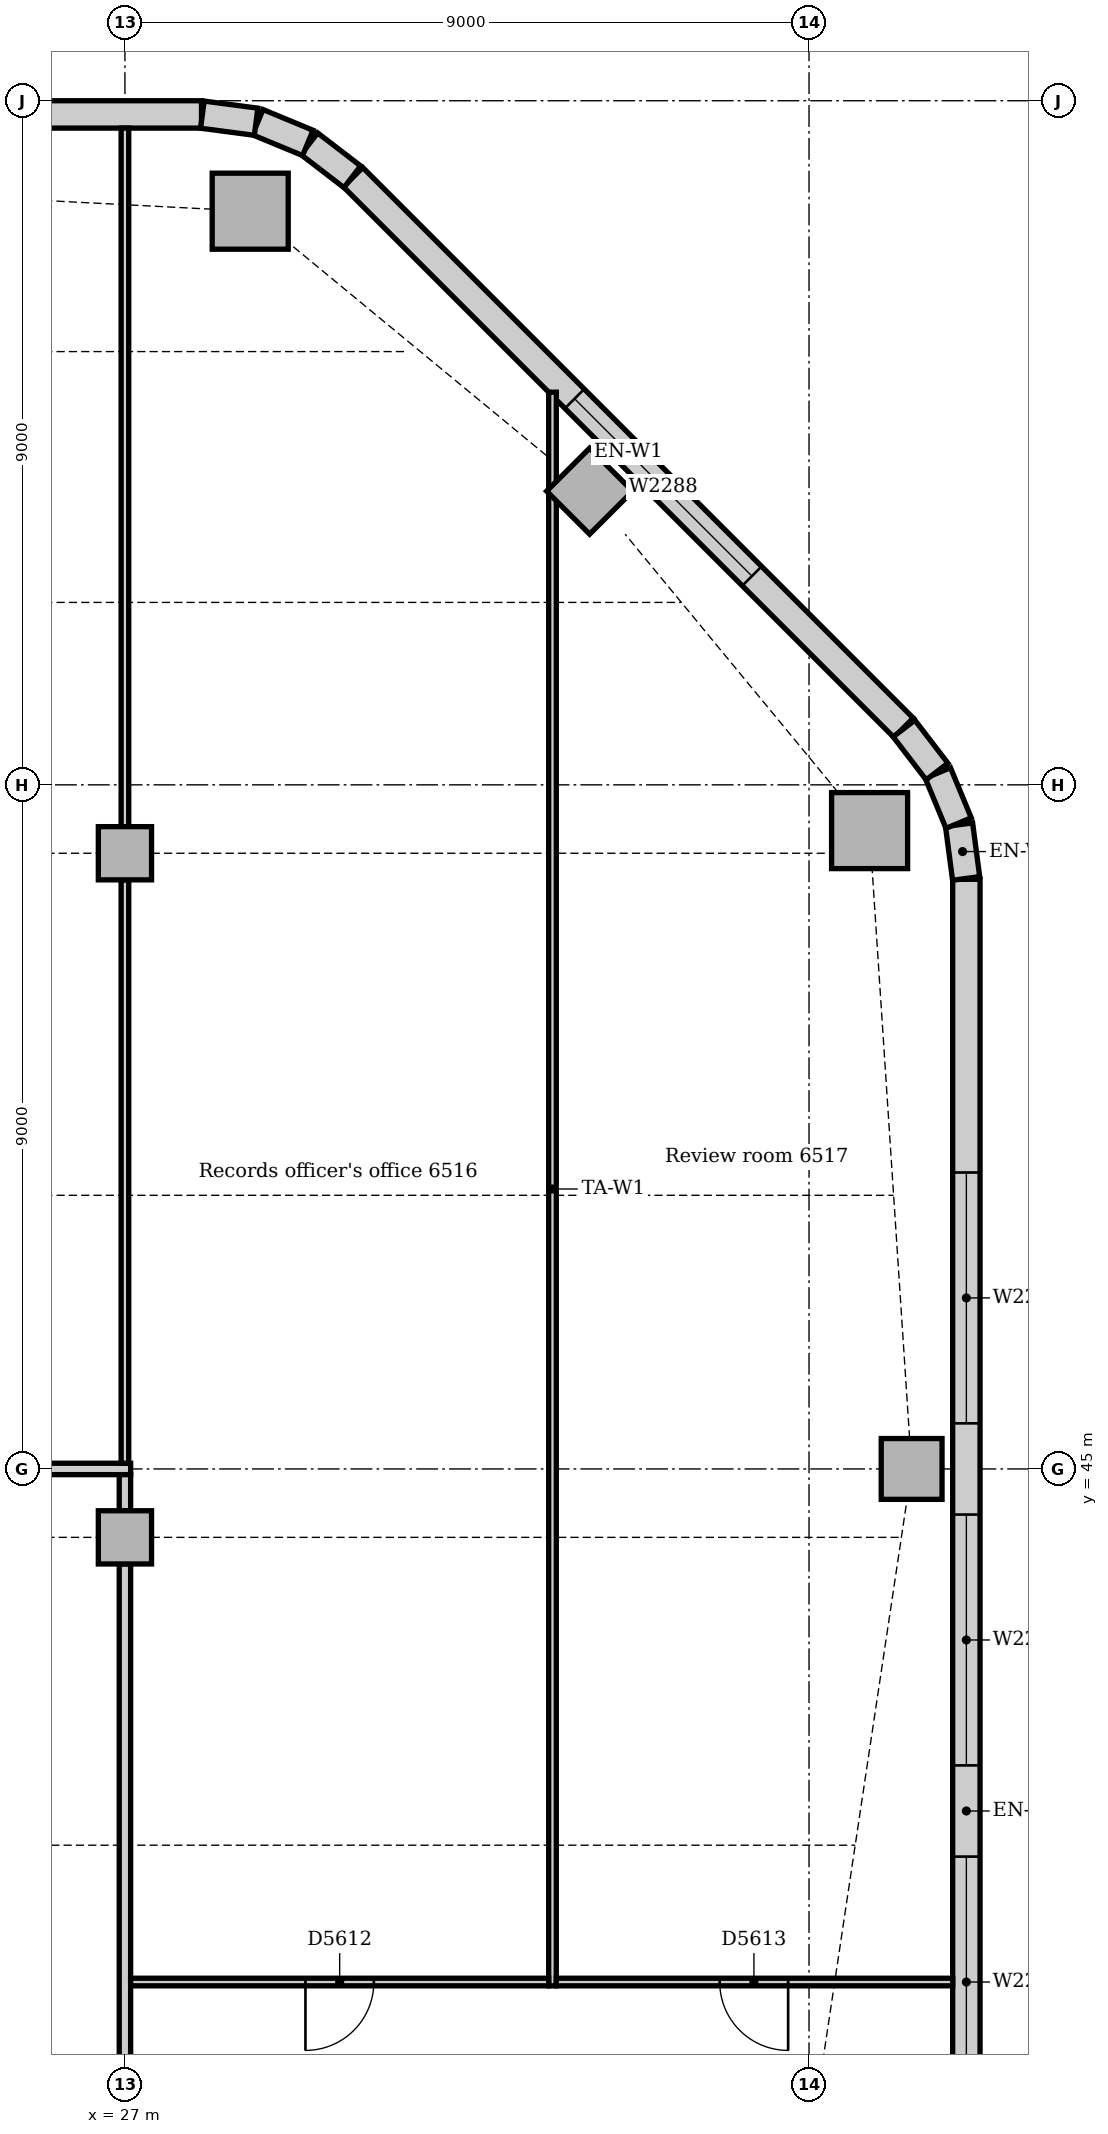
"""IFC4 building model, lengths in metres.
Left out: names, types, materials, properties, quantities, classifications, styles, units other than length and angle.
Written with IfcOpenShell. Run it as: python <this file> out.ifc"""

import sys

from ifc_helpers import new_model, si_unit, direction, frame, frame_2d, origin, origin_2d, place, context, subcontext, project, spatial, rectangle, extrude, element, fill, save


model = new_model("IFC4")
c1 = context("Model", 3, precision=1e-05, world=origin(), true_north=direction((0.0, 1.0)))
c2 = subcontext(c1, "Body", "Model", "MODEL_VIEW")
j1 = project(units=[si_unit("LENGTHUNIT", "METRE"), si_unit("PLANEANGLEUNIT", "RADIAN")], contexts=[c1])
p1 = place(None, origin())
s1 = spatial("IfcSite", under=j1, at=p1, CompositionType="ELEMENT")
p2 = place(p1, origin())
s2 = spatial("IfcBuilding", under=s1, at=p2, CompositionType="ELEMENT")
p3 = place(p2, frame((0.0, 0.0, 271.0)))
s3 = spatial("IfcBuildingStorey", under=s2, at=p3, CompositionType="ELEMENT", Elevation=271.0)
for number, where, z_axis, x_axis in (
    (1, (36.797, 53.398, 0.0), (0.0, 0.0, 1.0), (1.0, 0.0, 0.0)),
    (2, (28.648, 61.547, 0.0), (0.0, 0.0, 1.0), (1.0, 0.0, 0.0)),
):
    element("IfcColumn", number, at=place(p3, frame(where, z_axis=z_axis, x_axis=x_axis)), inside=s3, PredefinedType="COLUMN", context=c2, shape_type="SweptSolid", body=[
        extrude(rectangle(XDim=1.0, YDim=1.0, at=origin_2d()), origin(), (0.0, 0.0, 1.0), 3.85),
    ])
for number, where, z_axis, x_axis in (
    (3, (37.35, 45.0, 0.0), (0.0, 0.0, 1.0), (1.0, 0.0, 0.0)),
    (4, (33.114, 57.864, 0.0), (0.0, 0.0, 1.0), (0.707, 0.707, 0.0)),
):
    element("IfcColumn", number, at=place(p3, frame(where, z_axis=z_axis, x_axis=x_axis)), inside=s3, PredefinedType="COLUMN", context=c2, shape_type="SweptSolid", body=[
        extrude(rectangle(XDim=0.8, YDim=0.8, at=origin_2d()), origin(), (0.0, 0.0, 1.0), 3.85),
    ])
for number, where, z_axis, x_axis in (
    (5, (27.0, 44.1, 0.0), (0.0, 0.0, 1.0), (1.0, 0.0, 0.0)),
    (6, (27.0, 53.1, 0.0), (0.0, 0.0, 1.0), (1.0, 0.0, 0.0)),
):
    element("IfcColumn", number, at=place(p3, frame(where, z_axis=z_axis, x_axis=x_axis)), inside=s3, PredefinedType="COLUMN", context=c2, shape_type="SweptSolid", body=[
        extrude(rectangle(XDim=0.7, YDim=0.7, at=origin_2d()), origin(), (0.0, 0.0, 1.0), 3.85),
    ])
p4 = place(p3, frame((38.07, 28.243, 0.0), z_axis=(0.0, 0.0, 1.0), x_axis=(0.0, 1.0, 0.0)))
e7 = element("IfcWall", 7, at=p4, inside=s3, PredefinedType="STANDARD", context=c2, shape_type="SweptSolid", body=[
    extrude(rectangle(XDim=24.515, YDim=0.36, at=frame_2d((12.257, 0.0))), origin(), (0.0, 0.0, 1.0), 3.85),
])
p5 = place(p4, frame((3.857, 0.0, 0.9)))
e8 = element("IfcOpeningElement", 8, at=p5, cuts=e7, PredefinedType="OPENING", context=c2, shape_type="SweptSolid", body=[
    extrude(rectangle(XDim=3.3, YDim=1.6, at=frame_2d((1.65, 0.8))), frame((0.0, 0.19, 0.0), z_axis=(0.0, -1.0, 0.0), x_axis=(1.0, 0.0, 0.0)), (0.0, 0.0, 1.0), 0.38),
])
p6 = place(p4, frame((8.357, 0.0, 0.9)))
e9 = element("IfcOpeningElement", 9, at=p6, cuts=e7, PredefinedType="OPENING", context=c2, shape_type="SweptSolid", body=[
    extrude(rectangle(XDim=3.3, YDim=1.6, at=frame_2d((1.65, 0.8))), frame((0.0, 0.19, 0.0), z_axis=(0.0, -1.0, 0.0), x_axis=(1.0, 0.0, 0.0)), (0.0, 0.0, 1.0), 0.38),
])
p7 = place(p4, frame((12.857, 0.0, 0.9)))
e10 = element("IfcOpeningElement", 10, at=p7, cuts=e7, PredefinedType="OPENING", context=c2, shape_type="SweptSolid", body=[
    extrude(rectangle(XDim=3.3, YDim=1.6, at=frame_2d((1.65, 0.8))), frame((0.0, 0.19, 0.0), z_axis=(0.0, -1.0, 0.0), x_axis=(1.0, 0.0, 0.0)), (0.0, 0.0, 1.0), 0.38),
])
p8 = place(p4, frame((17.357, 0.0, 0.9)))
e11 = element("IfcOpeningElement", 11, at=p8, cuts=e7, PredefinedType="OPENING", context=c2, shape_type="SweptSolid", body=[
    extrude(rectangle(XDim=3.3, YDim=1.6, at=frame_2d((1.65, 0.8))), frame((0.0, 0.19, 0.0), z_axis=(0.0, -1.0, 0.0), x_axis=(1.0, 0.0, 0.0)), (0.0, 0.0, 1.0), 0.38),
])
p9 = place(p3, frame((37.244, 54.751, 0.0), z_axis=(0.0, 0.0, 1.0), x_axis=(-0.707106781187, 0.707106781187, 0.0)))
e12 = element("IfcWall", 12, at=p9, inside=s3, PredefinedType="STANDARD", context=c2, shape_type="SweptSolid", body=[
    extrude(rectangle(XDim=10.243, YDim=0.36, at=frame_2d((5.121, 0.0))), origin(), (0.0, 0.0, 1.0), 3.85),
])
p10 = place(p9, frame((2.821, 0.0, 0.9)))
e13 = element("IfcOpeningElement", 13, at=p10, cuts=e12, PredefinedType="OPENING", context=c2, shape_type="SweptSolid", body=[
    extrude(rectangle(XDim=3.3, YDim=1.6, at=frame_2d((1.65, 0.8))), frame((0.0, 0.19, 0.0), z_axis=(0.0, -1.0, 0.0), x_axis=(1.0, 0.0, 0.0)), (0.0, 0.0, 1.0), 0.38),
])
p11 = place(p3, frame((28.007, 62.82, 0.0), z_axis=(0.0, 0.0, 1.0), x_axis=(-1.0, 0.0, 0.0)))
e14 = element("IfcWall", 14, at=p11, inside=s3, PredefinedType="STANDARD", context=c2, shape_type="SweptSolid", body=[
    extrude(rectangle(XDim=23.765, YDim=0.36, at=frame_2d((11.882, 0.0))), origin(), (0.0, 0.0, 1.0), 3.85),
])
p12 = place(p11, frame((3.482, 0.0, 0.9)))
e15 = element("IfcOpeningElement", 15, at=p12, cuts=e14, PredefinedType="OPENING", context=c2, shape_type="SweptSolid", body=[
    extrude(rectangle(XDim=3.3, YDim=1.6, at=frame_2d((1.65, 0.8))), frame((0.0, 0.19, 0.0), z_axis=(0.0, -1.0, 0.0), x_axis=(1.0, 0.0, 0.0)), (0.0, 0.0, 1.0), 0.38),
])
p13 = place(p11, frame((7.982, 0.0, 0.9)))
e16 = element("IfcOpeningElement", 16, at=p13, cuts=e14, PredefinedType="OPENING", context=c2, shape_type="SweptSolid", body=[
    extrude(rectangle(XDim=3.3, YDim=1.6, at=frame_2d((1.65, 0.8))), frame((0.0, 0.19, 0.0), z_axis=(0.0, -1.0, 0.0), x_axis=(1.0, 0.0, 0.0)), (0.0, 0.0, 1.0), 0.38),
])
p14 = place(p11, frame((12.482, 0.0, 0.9)))
e17 = element("IfcOpeningElement", 17, at=p14, cuts=e14, PredefinedType="OPENING", context=c2, shape_type="SweptSolid", body=[
    extrude(rectangle(XDim=3.3, YDim=1.6, at=frame_2d((1.65, 0.8))), frame((0.0, 0.19, 0.0), z_axis=(0.0, -1.0, 0.0), x_axis=(1.0, 0.0, 0.0)), (0.0, 0.0, 1.0), 0.38),
])
p15 = place(p11, frame((16.982, 0.0, 0.9)))
e18 = element("IfcOpeningElement", 18, at=p15, cuts=e14, PredefinedType="OPENING", context=c2, shape_type="SweptSolid", body=[
    extrude(rectangle(XDim=3.3, YDim=1.6, at=frame_2d((1.65, 0.8))), frame((0.0, 0.19, 0.0), z_axis=(0.0, -1.0, 0.0), x_axis=(1.0, 0.0, 0.0)), (0.0, 0.0, 1.0), 0.38),
])
for number, where, z_axis, x_axis in (
    (19, (38.067, 52.769, 0.0), (0.0, 0.0, 1.0), (-0.131, 0.991, 0.0)),
    (20, (37.968, 53.497, 0.0), (0.0, 0.0, 1.0), (-0.383, 0.924, 0.0)),
):
    element("IfcWall", number, at=place(p3, frame(where, z_axis=z_axis, x_axis=x_axis)), inside=s3, PredefinedType="STANDARD", context=c2, shape_type="SweptSolid", body=[
        extrude(rectangle(XDim=0.713, YDim=0.36, at=frame_2d((0.356, 0.0))), origin(), (0.0, 0.0, 1.0), 3.85),
    ])
for number, where, z_axis, x_axis in (
    (21, (37.684, 54.175, 0.0), (0.0, 0.0, 1.0), (-0.609, 0.793, 0.0)),
    (22, (29.991, 62.0, 0.0), (0.0, 0.0, 1.0), (-0.793, 0.609, 0.0)),
):
    element("IfcWall", number, at=place(p3, frame(where, z_axis=z_axis, x_axis=x_axis)), inside=s3, PredefinedType="STANDARD", context=c2, shape_type="SweptSolid", body=[
        extrude(rectangle(XDim=0.713, YDim=0.36, at=frame_2d((0.357, 0.0))), origin(), (0.0, 0.0, 1.0), 3.85),
    ])
for number, where, z_axis, x_axis in (
    (23, (29.406, 62.445, 0.0), (0.0, 0.0, 1.0), (-0.924, 0.383, 0.0)),
    (24, (28.726, 62.724, 0.0), (0.0, 0.0, 1.0), (-0.991, 0.131, 0.0)),
):
    element("IfcWall", number, at=place(p3, frame(where, z_axis=z_axis, x_axis=x_axis)), inside=s3, PredefinedType="STANDARD", context=c2, shape_type="SweptSolid", body=[
        extrude(rectangle(XDim=0.713, YDim=0.36, at=frame_2d((0.356, 0.0))), origin(), (0.0, 0.0, 1.0), 3.85),
    ])
p16 = place(p3, frame((0.36, 45.0, 0.0), z_axis=(0.0, 0.0, 1.0), x_axis=(1.0, 0.0, 0.0)))
e25 = element("IfcWall", 25, at=p16, inside=s3, PredefinedType="PARTITIONING", context=c2, shape_type="SweptSolid", body=[
    extrude(rectangle(XDim=26.715, YDim=0.15, at=frame_2d((13.357, 0.0))), origin(), (0.0, 0.0, 1.0), 3.85),
])
p17 = place(p16, frame((3.9, 0.0, 0.0)))
e26 = element("IfcOpeningElement", 26, at=p17, cuts=e25, PredefinedType="OPENING", context=c2, shape_type="SweptSolid", body=[
    extrude(rectangle(XDim=1.0, YDim=2.1, at=frame_2d((0.5, 1.05))), frame((0.0, 0.085, 0.0), z_axis=(0.0, -1.0, 0.0), x_axis=(1.0, 0.0, 0.0)), (0.0, 0.0, 1.0), 0.17),
])
p18 = place(p16, frame((16.39, 0.0, 0.0)))
e27 = element("IfcOpeningElement", 27, at=p18, cuts=e25, PredefinedType="OPENING", context=c2, shape_type="SweptSolid", body=[
    extrude(rectangle(XDim=0.9, YDim=2.1, at=frame_2d((0.45, 1.05))), frame((0.0, 0.085, 0.0), z_axis=(0.0, -1.0, 0.0), x_axis=(1.0, 0.0, 0.0)), (0.0, 0.0, 1.0), 0.17),
])
p19 = place(p3, frame((27.0, 36.35, 0.0), z_axis=(0.0, 0.0, 1.0), x_axis=(0.0, 1.0, 0.0)))
e28 = element("IfcWall", 28, at=p19, inside=s3, PredefinedType="PARTITIONING", context=c2, shape_type="SweptSolid", body=[
    extrude(rectangle(XDim=7.4, YDim=0.15, at=frame_2d((3.7, 0.0))), origin(), (0.0, 0.0, 1.0), 3.4),
])
p20 = place(p3, frame((27.0, 44.45, 0.0), z_axis=(0.0, 0.0, 1.0), x_axis=(0.0, 1.0, 0.0)))
e29 = element("IfcWall", 29, at=p20, inside=s3, PredefinedType="PARTITIONING", context=c2, shape_type="SweptSolid", body=[
    extrude(rectangle(XDim=0.475, YDim=0.15, at=frame_2d((0.237, 0.0))), origin(), (0.0, 0.0, 1.0), 3.85),
])
p21 = place(p3, frame((32.625, 38.2, 0.0), z_axis=(0.0, 0.0, 1.0), x_axis=(0.0, 1.0, 0.0)))
e30 = element("IfcWall", 30, at=p21, inside=s3, PredefinedType="PARTITIONING", context=c2, shape_type="SweptSolid", body=[
    extrude(rectangle(XDim=20.966, YDim=0.1, at=frame_2d((10.483, 0.0))), origin(), (0.0, 0.0, 1.0), 3.85),
])
p22 = place(p3, frame((27.0, 45.075, 0.0), z_axis=(0.0, 0.0, 1.0), x_axis=(0.0, 1.0, 0.0)))
e31 = element("IfcWall", 31, at=p22, inside=s3, PredefinedType="PARTITIONING", context=c2, shape_type="SweptSolid", body=[
    extrude(rectangle(XDim=7.675, YDim=0.1, at=frame_2d((3.837, 0.0))), origin(), (0.0, 0.0, 1.0), 3.4),
])
p23 = place(p3, frame((27.0, 53.45, 0.0), z_axis=(0.0, 0.0, 1.0), x_axis=(0.0, 1.0, 0.0)))
e32 = element("IfcWall", 32, at=p23, inside=s3, PredefinedType="PARTITIONING", context=c2, shape_type="SweptSolid", body=[
    extrude(rectangle(XDim=9.19, YDim=0.1, at=frame_2d((4.595, 0.0))), origin(), (0.0, 0.0, 1.0), 3.4),
])
p24 = place(p3, frame((27.075, 38.25, 0.0), z_axis=(0.0, 0.0, 1.0), x_axis=(1.0, 0.0, 0.0)))
e33 = element("IfcWall", 33, at=p24, inside=s3, PredefinedType="PARTITIONING", context=c2, shape_type="SweptSolid", body=[
    extrude(rectangle(XDim=5.5, YDim=0.1, at=frame_2d((2.75, 0.0))), origin(), (0.0, 0.0, 1.0), 3.85),
])
p25 = place(p24, frame((2.3, 0.0, 0.0)))
e34 = element("IfcOpeningElement", 34, at=p25, cuts=e33, PredefinedType="OPENING", context=c2, shape_type="SweptSolid", body=[
    extrude(rectangle(XDim=0.9, YDim=2.1, at=frame_2d((0.45, 1.05))), frame((0.0, 0.06, 0.0), z_axis=(0.0, -1.0, 0.0), x_axis=(1.0, 0.0, 0.0)), (0.0, 0.0, 1.0), 0.12),
])
p26 = place(p3, frame((32.675, 38.25, 0.0), z_axis=(0.0, 0.0, 1.0), x_axis=(1.0, 0.0, 0.0)))
e35 = element("IfcWall", 35, at=p26, inside=s3, PredefinedType="PARTITIONING", context=c2, shape_type="SweptSolid", body=[
    extrude(rectangle(XDim=5.215, YDim=0.1, at=frame_2d((2.607, 0.0))), origin(), (0.0, 0.0, 1.0), 3.85),
])
p27 = place(p26, frame((2.15, 0.0, 0.0)))
e36 = element("IfcOpeningElement", 36, at=p27, cuts=e35, PredefinedType="OPENING", context=c2, shape_type="SweptSolid", body=[
    extrude(rectangle(XDim=0.9, YDim=2.1, at=frame_2d((0.45, 1.05))), frame((0.0, 0.06, 0.0), z_axis=(0.0, -1.0, 0.0), x_axis=(1.0, 0.0, 0.0)), (0.0, 0.0, 1.0), 0.12),
])
p28 = place(p6, origin())
e37 = element("IfcWindow", 37, at=p28, inside=s3, PartitioningType="SINGLE_PANEL", PredefinedType="WINDOW", context=c2, shape_type="SweptSolid", body=[
    extrude(rectangle(XDim=3.3, YDim=1.6, at=frame_2d((1.65, 0.8))), frame((0.0, 0.13, 0.0), z_axis=(0.0, -1.0, 0.0), x_axis=(1.0, 0.0, 0.0)), (0.0, 0.0, 1.0), 0.06),
])
fill(e9, e37)
p29 = place(p7, origin())
e38 = element("IfcWindow", 38, at=p29, inside=s3, PartitioningType="SINGLE_PANEL", PredefinedType="WINDOW", context=c2, shape_type="SweptSolid", body=[
    extrude(rectangle(XDim=3.3, YDim=1.6, at=frame_2d((1.65, 0.8))), frame((0.0, 0.13, 0.0), z_axis=(0.0, -1.0, 0.0), x_axis=(1.0, 0.0, 0.0)), (0.0, 0.0, 1.0), 0.06),
])
fill(e10, e38)
p30 = place(p8, origin())
e39 = element("IfcWindow", 39, at=p30, inside=s3, PartitioningType="SINGLE_PANEL", PredefinedType="WINDOW", context=c2, shape_type="SweptSolid", body=[
    extrude(rectangle(XDim=3.3, YDim=1.6, at=frame_2d((1.65, 0.8))), frame((0.0, 0.13, 0.0), z_axis=(0.0, -1.0, 0.0), x_axis=(1.0, 0.0, 0.0)), (0.0, 0.0, 1.0), 0.06),
])
fill(e11, e39)
p31 = place(p10, origin())
e40 = element("IfcWindow", 40, at=p31, inside=s3, PartitioningType="SINGLE_PANEL", PredefinedType="WINDOW", context=c2, shape_type="SweptSolid", body=[
    extrude(rectangle(XDim=3.3, YDim=1.6, at=frame_2d((1.65, 0.8))), frame((0.0, 0.13, 0.0), z_axis=(0.0, -1.0, 0.0), x_axis=(1.0, 0.0, 0.0)), (0.0, 0.0, 1.0), 0.06),
])
fill(e13, e40)
p32 = place(p25, frame((0.9, 0.0, 0.0), z_axis=(0.0, 0.0, 1.0), x_axis=(-1.0, 0.0, 0.0)))
e41 = element("IfcDoor", 41, at=p32, inside=s3, OperationType="SINGLE_SWING_RIGHT", PredefinedType="DOOR", context=c2, shape_type="SweptSolid", body=[
    extrude(rectangle(XDim=0.9, YDim=2.1, at=frame_2d((0.45, 1.05))), frame((0.0, 0.025, 0.0), z_axis=(0.0, -1.0, 0.0), x_axis=(1.0, 0.0, 0.0)), (0.0, 0.0, 1.0), 0.05),
])
fill(e34, e41)
p33 = place(p27, frame((0.9, 0.0, 0.0), z_axis=(0.0, 0.0, 1.0), x_axis=(-1.0, 0.0, 0.0)))
e42 = element("IfcDoor", 42, at=p33, inside=s3, OperationType="SINGLE_SWING_LEFT", PredefinedType="DOOR", context=c2, shape_type="SweptSolid", body=[
    extrude(rectangle(XDim=0.9, YDim=2.1, at=frame_2d((0.45, 1.05))), frame((0.0, 0.025, 0.0), z_axis=(0.0, -1.0, 0.0), x_axis=(1.0, 0.0, 0.0)), (0.0, 0.0, 1.0), 0.05),
])
fill(e36, e42)
save(model, sys.argv[1])
